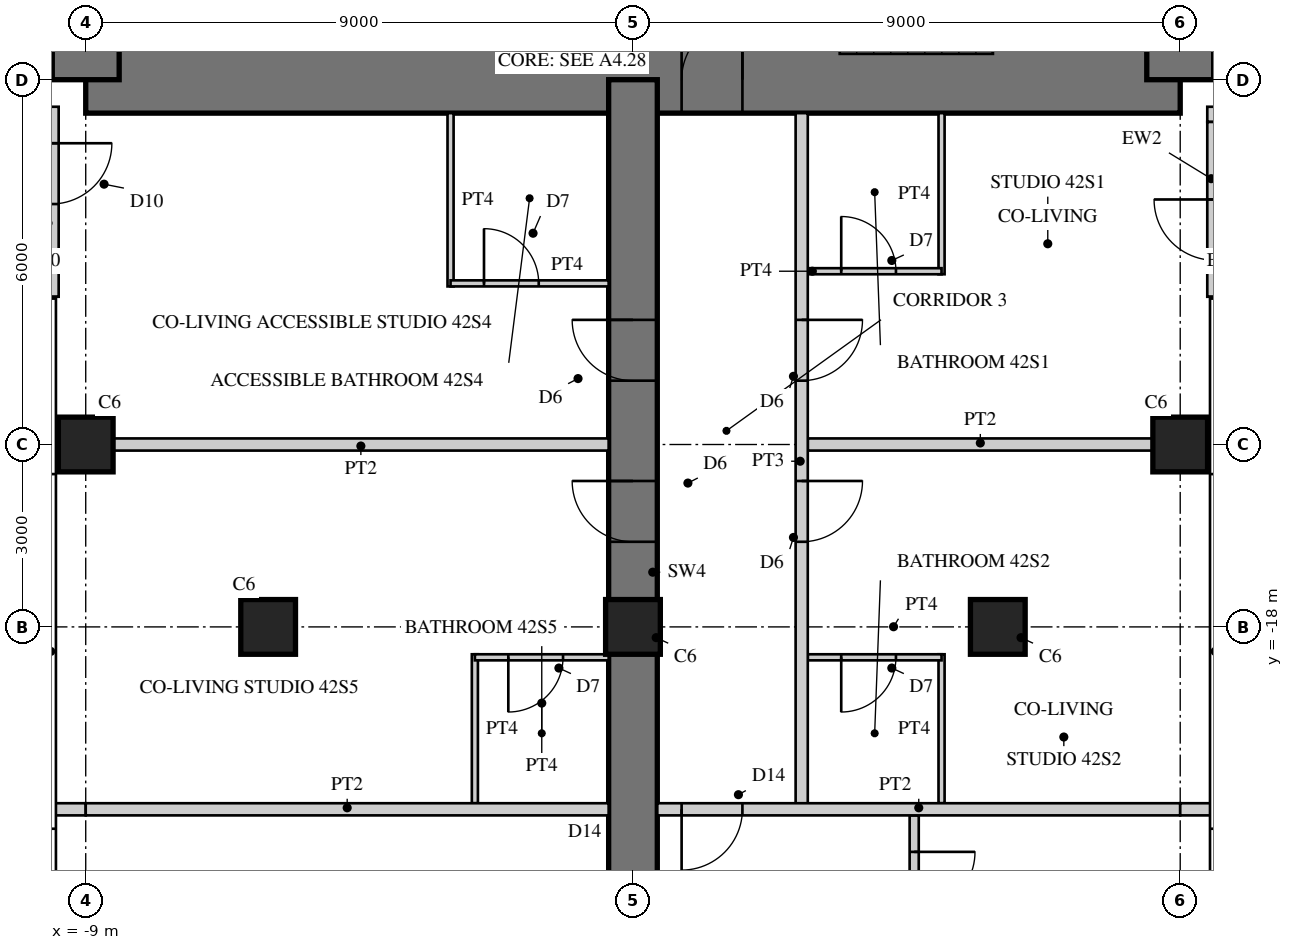
"""IFC4 building model, lengths in metres.
Left out: names, types, materials, properties, quantities, classifications, styles, units other than length and angle.
Written with IfcOpenShell. Run it as: python <this file> out.ifc"""

import sys

from ifc_helpers import new_model, si_unit, direction, frame, frame_2d, origin, origin_2d, place, context, subcontext, project, spatial, rectangle, hollow_rectangle, extrude, element, fill, save


model = new_model("IFC4")
c1 = context("Model", 3, precision=1e-05, world=origin(), true_north=direction((0.0, 1.0)))
c2 = subcontext(c1, "Body", "Model", "MODEL_VIEW")
j1 = project(units=[si_unit("LENGTHUNIT", "METRE"), si_unit("PLANEANGLEUNIT", "RADIAN")], contexts=[c1])
p1 = place(None, origin())
s1 = spatial("IfcSite", under=j1, at=p1, CompositionType="ELEMENT")
p2 = place(p1, origin())
s2 = spatial("IfcBuilding", under=s1, at=p2, CompositionType="ELEMENT")
p3 = place(p2, frame((0.0, 0.0, 172.9)))
s3 = spatial("IfcBuildingStorey", under=s2, at=p3, CompositionType="ELEMENT", Elevation=172.9)
p4 = place(p3, frame((-9.0, -9.0, 0.0), z_axis=(0.0, 0.0, 1.0), x_axis=(1.0, 0.0, 0.0)))
e1 = element("IfcWall", 1, at=p4, inside=s3, PredefinedType="SHEAR", context=c2, shape_type="SweptSolid", body=[
    extrude(rectangle(XDim=18.0, YDim=1.1, at=frame_2d((9.0, 0.0))), origin(), (0.0, 0.0, 1.0), 3.4),
])
p5 = place(p4, frame((9.8, 0.0, 0.0)))
e2 = element("IfcOpeningElement", 2, at=p5, cuts=e1, PredefinedType="OPENING", context=c2, shape_type="SweptSolid", body=[
    extrude(rectangle(XDim=1.0, YDim=2.4, at=frame_2d((0.5, 1.2))), frame((0.0, 0.56, 0.0), z_axis=(0.0, -1.0, 0.0), x_axis=(1.0, 0.0, 0.0)), (0.0, 0.0, 1.0), 1.12),
])
p6 = place(p3, frame((9.0, -9.0, 0.0), z_axis=(0.0, 0.0, 1.0), x_axis=(0.0, 1.0, 0.0)))
e3 = element("IfcWall", 3, at=p6, inside=s3, PredefinedType="SHEAR", context=c2, shape_type="SweptSolid", body=[
    extrude(rectangle(XDim=18.0, YDim=1.1, at=frame_2d((9.0, 0.0))), origin(), (0.0, 0.0, 1.0), 3.4),
])
p7 = place(p6, frame((9.8, 0.0, 0.0)))
e4 = element("IfcOpeningElement", 4, at=p7, cuts=e3, PredefinedType="OPENING", context=c2, shape_type="SweptSolid", body=[
    extrude(rectangle(XDim=1.0, YDim=2.4, at=frame_2d((0.5, 1.2))), frame((0.0, 0.56, 0.0), z_axis=(0.0, -1.0, 0.0), x_axis=(1.0, 0.0, 0.0)), (0.0, 0.0, 1.0), 1.12),
])
p8 = place(p3, frame((-9.0, 9.0, 0.0), z_axis=(0.0, 0.0, 1.0), x_axis=(0.0, -1.0, 0.0)))
e5 = element("IfcWall", 5, at=p8, inside=s3, PredefinedType="SHEAR", context=c2, shape_type="SweptSolid", body=[
    extrude(rectangle(XDim=18.0, YDim=1.1, at=frame_2d((9.0, 0.0))), origin(), (0.0, 0.0, 1.0), 3.4),
])
p9 = place(p8, frame((9.8, 0.0, 0.0)))
e6 = element("IfcOpeningElement", 6, at=p9, cuts=e5, PredefinedType="OPENING", context=c2, shape_type="SweptSolid", body=[
    extrude(rectangle(XDim=1.0, YDim=2.4, at=frame_2d((0.5, 1.2))), frame((0.0, 0.56, 0.0), z_axis=(0.0, -1.0, 0.0), x_axis=(1.0, 0.0, 0.0)), (0.0, 0.0, 1.0), 1.12),
])
p10 = place(p3, frame((0.0, -9.0, 0.0), z_axis=(0.0, 0.0, 1.0), x_axis=(0.0, -1.0, 0.0)))
e7 = element("IfcWall", 7, at=p10, inside=s3, PredefinedType="SHEAR", context=c2, shape_type="SweptSolid", body=[
    extrude(rectangle(XDim=18.0, YDim=0.8, at=frame_2d((9.0, 0.0))), origin(), (0.0, 0.0, 1.0), 3.4),
])
p11 = place(p10, frame((3.95, 0.0, 0.0)))
e8 = element("IfcOpeningElement", 8, at=p11, cuts=e7, PredefinedType="OPENING", context=c2, shape_type="SweptSolid", body=[
    extrude(rectangle(XDim=1.0, YDim=2.15, at=frame_2d((0.5, 1.075))), frame((0.0, 0.41, 0.0), z_axis=(0.0, -1.0, 0.0), x_axis=(1.0, 0.0, 0.0)), (0.0, 0.0, 1.0), 0.82),
])
p12 = place(p10, frame((6.6, 0.0, 0.0)))
e9 = element("IfcOpeningElement", 9, at=p12, cuts=e7, PredefinedType="OPENING", context=c2, shape_type="SweptSolid", body=[
    extrude(rectangle(XDim=1.0, YDim=2.15, at=frame_2d((0.5, 1.075))), frame((0.0, 0.41, 0.0), z_axis=(0.0, -1.0, 0.0), x_axis=(1.0, 0.0, 0.0)), (0.0, 0.0, 1.0), 0.82),
])
p13 = place(p10, frame((13.25, 0.0, 0.0)))
e10 = element("IfcOpeningElement", 10, at=p13, cuts=e7, PredefinedType="OPENING", context=c2, shape_type="SweptSolid", body=[
    extrude(rectangle(XDim=1.0, YDim=2.2, at=frame_2d((0.5, 1.1))), frame((0.0, 0.41, 0.0), z_axis=(0.0, -1.0, 0.0), x_axis=(1.0, 0.0, 0.0)), (0.0, 0.0, 1.0), 0.82),
])
for number, where, z_axis, x_axis in (
    (11, (-9.0, -15.0, 0.0), (0.0, 0.0, 1.0), (1.0, 0.0, 0.0)),
    (12, (9.0, -15.0, 0.0), (0.0, 0.0, 1.0), (1.0, 0.0, 0.0)),
    (13, (-6.0, -18.0, 0.0), (0.0, 0.0, 1.0), (1.0, 0.0, 0.0)),
    (14, (0.0, -18.0, 0.0), (0.0, 0.0, 1.0), (1.0, 0.0, 0.0)),
    (15, (6.0, -18.0, 0.0), (0.0, 0.0, 1.0), (1.0, 0.0, 0.0)),
):
    element("IfcColumn", number, at=place(p3, frame(where, z_axis=z_axis, x_axis=x_axis)), inside=s3, PredefinedType="COLUMN", context=c2, shape_type="SweptSolid", body=[
        extrude(rectangle(XDim=0.9, YDim=0.9, at=origin_2d()), origin(), (0.0, 0.0, 1.0), 3.4),
    ])
p14 = place(p3, frame((9.445, -9.57, 0.0), z_axis=(0.0, 0.0, 1.0), x_axis=(1.0, 0.0, 0.0)))
e16 = element("IfcWall", 16, at=p14, inside=s3, PredefinedType="SOLIDWALL", context=c2, shape_type="SweptSolid", body=[
    extrude(rectangle(XDim=3.125, YDim=0.25, at=frame_2d((1.562, 0.0))), origin(), (0.0, 0.0, 1.0), 3.22),
])
p15 = place(p14, frame((0.6, 0.0, 0.0)))
e17 = element("IfcOpeningElement", 17, at=p15, cuts=e16, PredefinedType="OPENING", context=c2, shape_type="SweptSolid", body=[
    extrude(rectangle(XDim=1.0, YDim=2.2, at=frame_2d((0.5, 1.1))), frame((0.0, 0.135, 0.0), z_axis=(0.0, -1.0, 0.0), x_axis=(1.0, 0.0, 0.0)), (0.0, 0.0, 1.0), 0.27),
])
p16 = place(p3, frame((-9.57, -9.445, 0.0), z_axis=(0.0, 0.0, 1.0), x_axis=(0.0, -1.0, 0.0)))
e18 = element("IfcWall", 18, at=p16, inside=s3, PredefinedType="SOLIDWALL", context=c2, shape_type="SweptSolid", body=[
    extrude(rectangle(XDim=3.125, YDim=0.25, at=frame_2d((1.562, 0.0))), origin(), (0.0, 0.0, 1.0), 3.22),
])
p17 = place(p16, frame((0.6, 0.0, 0.0)))
e19 = element("IfcOpeningElement", 19, at=p17, cuts=e18, PredefinedType="OPENING", context=c2, shape_type="SweptSolid", body=[
    extrude(rectangle(XDim=1.0, YDim=2.2, at=frame_2d((0.5, 1.1))), frame((0.0, 0.135, 0.0), z_axis=(0.0, -1.0, 0.0), x_axis=(1.0, 0.0, 0.0)), (0.0, 0.0, 1.0), 0.27),
])
p18 = place(p3, frame((9.57, -12.57, 0.0), z_axis=(0.0, 0.0, 1.0), x_axis=(0.0, 1.0, 0.0)))
e20 = element("IfcWall", 20, at=p18, inside=s3, PredefinedType="SOLIDWALL", context=c2, shape_type="SweptSolid", body=[
    extrude(rectangle(XDim=2.875, YDim=0.25, at=frame_2d((1.438, 0.0))), origin(), (0.0, 0.0, 1.0), 3.22),
])
p19 = place(p18, frame((0.6, 0.0, 0.0)))
e21 = element("IfcOpeningElement", 21, at=p19, cuts=e20, PredefinedType="OPENING", context=c2, shape_type="SweptSolid", body=[
    extrude(rectangle(XDim=1.0, YDim=2.2, at=frame_2d((0.5, 1.1))), frame((0.0, 0.135, 0.0), z_axis=(0.0, -1.0, 0.0), x_axis=(1.0, 0.0, 0.0)), (0.0, 0.0, 1.0), 0.27),
])
p20 = place(p3, frame((5.075, -9.55, 0.0), z_axis=(0.0, 0.0, 1.0), x_axis=(0.0, -1.0, 0.0)))
e22 = element("IfcWall", 22, at=p20, inside=s3, PredefinedType="PARTITIONING", context=c2, shape_type="SweptSolid", body=[
    extrude(rectangle(XDim=2.65, YDim=0.1, at=frame_2d((1.325, 0.0))), origin(), (0.0, 0.0, 1.0), 3.22),
])
p21 = place(p3, frame((2.875, -12.15, 0.0), z_axis=(0.0, 0.0, 1.0), x_axis=(1.0, 0.0, 0.0)))
e23 = element("IfcWall", 23, at=p21, inside=s3, PredefinedType="PARTITIONING", context=c2, shape_type="SweptSolid", body=[
    extrude(rectangle(XDim=2.2, YDim=0.1, at=frame_2d((1.1, 0.0))), origin(), (0.0, 0.0, 1.0), 3.22),
])
p22 = place(p21, frame((0.55, 0.0, 0.0)))
e24 = element("IfcOpeningElement", 24, at=p22, cuts=e23, PredefinedType="OPENING", context=c2, shape_type="SweptSolid", body=[
    extrude(rectangle(XDim=0.9, YDim=2.1, at=frame_2d((0.45, 1.05))), frame((0.0, 0.06, 0.0), z_axis=(0.0, -1.0, 0.0), x_axis=(1.0, 0.0, 0.0)), (0.0, 0.0, 1.0), 0.12),
])
p23 = place(p3, frame((-3.0, -9.55, 0.0), z_axis=(0.0, 0.0, 1.0), x_axis=(0.0, -1.0, 0.0)))
e25 = element("IfcWall", 25, at=p23, inside=s3, PredefinedType="PARTITIONING", context=c2, shape_type="SweptSolid", body=[
    extrude(rectangle(XDim=2.85, YDim=0.1, at=frame_2d((1.425, 0.0))), origin(), (0.0, 0.0, 1.0), 3.22),
])
p24 = place(p3, frame((-3.0, -12.35, 0.0), z_axis=(0.0, 0.0, 1.0), x_axis=(1.0, 0.0, 0.0)))
e26 = element("IfcWall", 26, at=p24, inside=s3, PredefinedType="PARTITIONING", context=c2, shape_type="SweptSolid", body=[
    extrude(rectangle(XDim=2.6, YDim=0.1, at=frame_2d((1.3, 0.0))), origin(), (0.0, 0.0, 1.0), 3.22),
])
p25 = place(p24, frame((0.55, 0.0, 0.0)))
e27 = element("IfcOpeningElement", 27, at=p25, cuts=e26, PredefinedType="OPENING", context=c2, shape_type="SweptSolid", body=[
    extrude(rectangle(XDim=0.9, YDim=2.1, at=frame_2d((0.45, 1.05))), frame((0.0, 0.06, 0.0), z_axis=(0.0, -1.0, 0.0), x_axis=(1.0, 0.0, 0.0)), (0.0, 0.0, 1.0), 0.12),
])
p26 = place(p3, frame((2.875, -15.0, 0.0), z_axis=(0.0, 0.0, 1.0), x_axis=(1.0, 0.0, 0.0)))
e28 = element("IfcWall", 28, at=p26, inside=s3, PredefinedType="SOLIDWALL", context=c2, shape_type="SweptSolid", body=[
    extrude(rectangle(XDim=5.675, YDim=0.2, at=frame_2d((2.837, 0.0))), origin(), (0.0, 0.0, 1.0), 2.47),
])
p27 = place(p3, frame((-8.55, -15.0, 0.0), z_axis=(0.0, 0.0, 1.0), x_axis=(1.0, 0.0, 0.0)))
e29 = element("IfcWall", 29, at=p27, inside=s3, PredefinedType="SOLIDWALL", context=c2, shape_type="SweptSolid", body=[
    extrude(rectangle(XDim=8.15, YDim=0.2, at=frame_2d((4.075, 0.0))), origin(), (0.0, 0.0, 1.0), 2.47),
])
p28 = place(p3, frame((5.075, -18.45, 0.0), z_axis=(0.0, 0.0, 1.0), x_axis=(0.0, -1.0, 0.0)))
e30 = element("IfcWall", 30, at=p28, inside=s3, PredefinedType="PARTITIONING", context=c2, shape_type="SweptSolid", body=[
    extrude(rectangle(XDim=2.45, YDim=0.1, at=frame_2d((1.225, 0.0))), origin(), (0.0, 0.0, 1.0), 3.22),
])
p29 = place(p3, frame((2.875, -18.5, 0.0), z_axis=(0.0, 0.0, 1.0), x_axis=(1.0, 0.0, 0.0)))
e31 = element("IfcWall", 31, at=p29, inside=s3, PredefinedType="PARTITIONING", context=c2, shape_type="SweptSolid", body=[
    extrude(rectangle(XDim=2.2, YDim=0.1, at=frame_2d((1.1, 0.0))), origin(), (0.0, 0.0, 1.0), 3.22),
])
p30 = place(p29, frame((0.55, 0.0, 0.0)))
e32 = element("IfcOpeningElement", 32, at=p30, cuts=e31, PredefinedType="OPENING", context=c2, shape_type="SweptSolid", body=[
    extrude(rectangle(XDim=0.9, YDim=2.1, at=frame_2d((0.45, 1.05))), frame((0.0, 0.06, 0.0), z_axis=(0.0, -1.0, 0.0), x_axis=(1.0, 0.0, 0.0)), (0.0, 0.0, 1.0), 0.12),
])
p31 = place(p3, frame((-2.6, -18.45, 0.0), z_axis=(0.0, 0.0, 1.0), x_axis=(0.0, -1.0, 0.0)))
e33 = element("IfcWall", 33, at=p31, inside=s3, PredefinedType="PARTITIONING", context=c2, shape_type="SweptSolid", body=[
    extrude(rectangle(XDim=2.45, YDim=0.1, at=frame_2d((1.225, 0.0))), origin(), (0.0, 0.0, 1.0), 3.22),
])
p32 = place(p3, frame((-2.6, -18.5, 0.0), z_axis=(0.0, 0.0, 1.0), x_axis=(1.0, 0.0, 0.0)))
e34 = element("IfcWall", 34, at=p32, inside=s3, PredefinedType="PARTITIONING", context=c2, shape_type="SweptSolid", body=[
    extrude(rectangle(XDim=2.2, YDim=0.1, at=frame_2d((1.1, 0.0))), origin(), (0.0, 0.0, 1.0), 3.22),
])
p33 = place(p32, frame((0.55, 0.0, 0.0)))
e35 = element("IfcOpeningElement", 35, at=p33, cuts=e34, PredefinedType="OPENING", context=c2, shape_type="SweptSolid", body=[
    extrude(rectangle(XDim=0.9, YDim=2.1, at=frame_2d((0.45, 1.05))), frame((0.0, 0.06, 0.0), z_axis=(0.0, -1.0, 0.0), x_axis=(1.0, 0.0, 0.0)), (0.0, 0.0, 1.0), 0.12),
])
p34 = place(p3, frame((2.775, -9.55, 0.0), z_axis=(0.0, 0.0, 1.0), x_axis=(0.0, -1.0, 0.0)))
e36 = element("IfcWall", 36, at=p34, inside=s3, PredefinedType="SOLIDWALL", context=c2, shape_type="SweptSolid", body=[
    extrude(rectangle(XDim=11.45, YDim=0.2, at=frame_2d((5.725, 0.0))), origin(), (0.0, 0.0, 1.0), 3.22),
])
p35 = place(p34, frame((3.4, 0.0, 0.0)))
e37 = element("IfcOpeningElement", 37, at=p35, cuts=e36, PredefinedType="OPENING", context=c2, shape_type="SweptSolid", body=[
    extrude(rectangle(XDim=1.0, YDim=2.15, at=frame_2d((0.5, 1.075))), frame((0.0, 0.11, 0.0), z_axis=(0.0, -1.0, 0.0), x_axis=(1.0, 0.0, 0.0)), (0.0, 0.0, 1.0), 0.22),
])
p36 = place(p34, frame((6.05, 0.0, 0.0)))
e38 = element("IfcOpeningElement", 38, at=p36, cuts=e36, PredefinedType="OPENING", context=c2, shape_type="SweptSolid", body=[
    extrude(rectangle(XDim=1.0, YDim=2.15, at=frame_2d((0.5, 1.075))), frame((0.0, 0.11, 0.0), z_axis=(0.0, -1.0, 0.0), x_axis=(1.0, 0.0, 0.0)), (0.0, 0.0, 1.0), 0.22),
])
p37 = place(p3, frame((4.625, -21.1, 0.0), z_axis=(0.0, 0.0, 1.0), x_axis=(0.0, -1.0, 0.0)))
e39 = element("IfcWall", 39, at=p37, inside=s3, PredefinedType="PARTITIONING", context=c2, shape_type="SweptSolid", body=[
    extrude(rectangle(XDim=5.5, YDim=0.15, at=frame_2d((2.75, 0.0))), origin(), (0.0, 0.0, 1.0), 3.22),
])
p38 = place(p37, frame((0.6, 0.0, 0.0)))
e40 = element("IfcOpeningElement", 40, at=p38, cuts=e39, PredefinedType="OPENING", context=c2, shape_type="SweptSolid", body=[
    extrude(rectangle(XDim=1.0, YDim=2.1, at=frame_2d((0.5, 1.05))), frame((0.0, 0.085, 0.0), z_axis=(0.0, -1.0, 0.0), x_axis=(1.0, 0.0, 0.0)), (0.0, 0.0, 1.0), 0.17),
])
p39 = place(p3, frame((-9.53, -21.0, 0.0), z_axis=(0.0, 0.0, 1.0), x_axis=(1.0, 0.0, 0.0)))
e41 = element("IfcWall", 41, at=p39, inside=s3, PredefinedType="SOLIDWALL", context=c2, shape_type="SweptSolid", body=[
    extrude(rectangle(XDim=0.53, YDim=0.2, at=frame_2d((0.265, 0.0))), origin(), (0.0, 0.0, 1.0), 3.22),
])
p40 = place(p3, frame((-9.0, -21.0, 0.0), z_axis=(0.0, 0.0, 1.0), x_axis=(1.0, 0.0, 0.0)))
e42 = element("IfcWall", 42, at=p40, inside=s3, PredefinedType="SOLIDWALL", context=c2, shape_type="SweptSolid", body=[
    extrude(rectangle(XDim=8.6, YDim=0.2, at=frame_2d((4.3, 0.0))), origin(), (0.0, 0.0, 1.0), 2.62),
])
p41 = place(p3, frame((0.4, -21.0, 0.0), z_axis=(0.0, 0.0, 1.0), x_axis=(1.0, 0.0, 0.0)))
e43 = element("IfcWall", 43, at=p41, inside=s3, PredefinedType="SOLIDWALL", context=c2, shape_type="SweptSolid", body=[
    extrude(rectangle(XDim=8.6, YDim=0.2, at=frame_2d((4.3, 0.0))), origin(), (0.0, 0.0, 1.0), 2.62),
])
p42 = place(p41, frame((0.4, 0.0, 0.0)))
e44 = element("IfcOpeningElement", 44, at=p42, cuts=e43, PredefinedType="OPENING", context=c2, shape_type="SweptSolid", body=[
    extrude(rectangle(XDim=1.0, YDim=2.2, at=frame_2d((0.5, 1.1))), frame((0.0, 0.11, 0.0), z_axis=(0.0, -1.0, 0.0), x_axis=(1.0, 0.0, 0.0)), (0.0, 0.0, 1.0), 0.22),
])
p43 = place(p3, frame((9.0, -21.0, 0.0), z_axis=(0.0, 0.0, 1.0), x_axis=(1.0, 0.0, 0.0)))
e45 = element("IfcWall", 45, at=p43, inside=s3, PredefinedType="SOLIDWALL", context=c2, shape_type="SweptSolid", body=[
    extrude(rectangle(XDim=0.53, YDim=0.2, at=frame_2d((0.265, 0.0))), origin(), (0.0, 0.0, 1.0), 3.22),
])
p44 = place(p17, origin())
e46 = element("IfcDoor", 46, at=p44, inside=s3, OperationType="SINGLE_SWING_LEFT", PredefinedType="DOOR", context=c2, shape_type="SweptSolid", body=[
    extrude(hollow_rectangle(XDim=1.0, YDim=2.2, WallThickness=0.06, at=frame_2d((0.5, 1.1))), frame((0.0, 0.025, 0.0), z_axis=(0.0, -1.0, 0.0), x_axis=(1.0, 0.0, 0.0)), (0.0, 0.0, 1.0), 0.05),
    extrude(rectangle(XDim=0.879, YDim=2.079, at=frame_2d((0.5, 1.1))), frame((0.0, 0.025, 0.0), z_axis=(0.0, -1.0, 0.0), x_axis=(1.0, 0.0, 0.0)), (0.0, 0.0, 1.0), 0.05),
])
fill(e19, e46)
p45 = place(p19, origin())
e47 = element("IfcDoor", 47, at=p45, inside=s3, OperationType="SINGLE_SWING_RIGHT", PredefinedType="DOOR", context=c2, shape_type="SweptSolid", body=[
    extrude(hollow_rectangle(XDim=1.0, YDim=2.2, WallThickness=0.06, at=frame_2d((0.5, 1.1))), frame((0.0, 0.025, 0.0), z_axis=(0.0, -1.0, 0.0), x_axis=(1.0, 0.0, 0.0)), (0.0, 0.0, 1.0), 0.05),
    extrude(rectangle(XDim=0.879, YDim=2.079, at=frame_2d((0.5, 1.1))), frame((0.0, 0.025, 0.0), z_axis=(0.0, -1.0, 0.0), x_axis=(1.0, 0.0, 0.0)), (0.0, 0.0, 1.0), 0.05),
])
fill(e21, e47)
p46 = place(p22, origin())
e48 = element("IfcDoor", 48, at=p46, inside=s3, OperationType="SINGLE_SWING_LEFT", PredefinedType="DOOR", context=c2, shape_type="SweptSolid", body=[
    extrude(rectangle(XDim=0.9, YDim=2.1, at=frame_2d((0.45, 1.05))), frame((0.0, 0.025, 0.0), z_axis=(0.0, -1.0, 0.0), x_axis=(1.0, 0.0, 0.0)), (0.0, 0.0, 1.0), 0.05),
])
fill(e24, e48)
p47 = place(p25, origin())
e49 = element("IfcDoor", 49, at=p47, inside=s3, OperationType="SINGLE_SWING_LEFT", PredefinedType="DOOR", context=c2, shape_type="SweptSolid", body=[
    extrude(rectangle(XDim=0.9, YDim=2.1, at=frame_2d((0.45, 1.05))), frame((0.0, 0.025, 0.0), z_axis=(0.0, -1.0, 0.0), x_axis=(1.0, 0.0, 0.0)), (0.0, 0.0, 1.0), 0.05),
])
fill(e27, e49)
p48 = place(p30, frame((0.9, 0.0, 0.0), z_axis=(0.0, 0.0, 1.0), x_axis=(-1.0, 0.0, 0.0)))
e50 = element("IfcDoor", 50, at=p48, inside=s3, OperationType="SINGLE_SWING_RIGHT", PredefinedType="DOOR", context=c2, shape_type="SweptSolid", body=[
    extrude(rectangle(XDim=0.9, YDim=2.1, at=frame_2d((0.45, 1.05))), frame((0.0, 0.025, 0.0), z_axis=(0.0, -1.0, 0.0), x_axis=(1.0, 0.0, 0.0)), (0.0, 0.0, 1.0), 0.05),
])
fill(e32, e50)
p49 = place(p33, frame((0.9, 0.0, 0.0), z_axis=(0.0, 0.0, 1.0), x_axis=(-1.0, 0.0, 0.0)))
e51 = element("IfcDoor", 51, at=p49, inside=s3, OperationType="SINGLE_SWING_RIGHT", PredefinedType="DOOR", context=c2, shape_type="SweptSolid", body=[
    extrude(rectangle(XDim=0.9, YDim=2.1, at=frame_2d((0.45, 1.05))), frame((0.0, 0.025, 0.0), z_axis=(0.0, -1.0, 0.0), x_axis=(1.0, 0.0, 0.0)), (0.0, 0.0, 1.0), 0.05),
])
fill(e35, e51)
p50 = place(p35, origin())
e52 = element("IfcDoor", 52, at=p50, inside=s3, OperationType="SINGLE_SWING_LEFT", PredefinedType="DOOR", context=c2, shape_type="SweptSolid", body=[
    extrude(rectangle(XDim=1.0, YDim=2.15, at=frame_2d((0.5, 1.075))), frame((0.0, 0.025, 0.0), z_axis=(0.0, -1.0, 0.0), x_axis=(1.0, 0.0, 0.0)), (0.0, 0.0, 1.0), 0.05),
])
fill(e37, e52)
p51 = place(p36, origin())
e53 = element("IfcDoor", 53, at=p51, inside=s3, OperationType="SINGLE_SWING_LEFT", PredefinedType="DOOR", context=c2, shape_type="SweptSolid", body=[
    extrude(rectangle(XDim=1.0, YDim=2.15, at=frame_2d((0.5, 1.075))), frame((0.0, 0.025, 0.0), z_axis=(0.0, -1.0, 0.0), x_axis=(1.0, 0.0, 0.0)), (0.0, 0.0, 1.0), 0.05),
])
fill(e38, e53)
p52 = place(p38, origin())
e54 = element("IfcDoor", 54, at=p52, inside=s3, OperationType="SINGLE_SWING_LEFT", PredefinedType="DOOR", context=c2, shape_type="SweptSolid", body=[
    extrude(rectangle(XDim=1.0, YDim=2.1, at=frame_2d((0.5, 1.05))), frame((0.0, 0.025, 0.0), z_axis=(0.0, -1.0, 0.0), x_axis=(1.0, 0.0, 0.0)), (0.0, 0.0, 1.0), 0.05),
])
fill(e40, e54)
p53 = place(p42, frame((1.0, 0.0, 0.0), z_axis=(0.0, 0.0, 1.0), x_axis=(-1.0, 0.0, 0.0)))
e55 = element("IfcDoor", 55, at=p53, inside=s3, OperationType="SINGLE_SWING_RIGHT", PredefinedType="DOOR", context=c2, shape_type="SweptSolid", body=[
    extrude(rectangle(XDim=1.0, YDim=2.2, at=frame_2d((0.5, 1.1))), frame((0.0, 0.025, 0.0), z_axis=(0.0, -1.0, 0.0), x_axis=(1.0, 0.0, 0.0)), (0.0, 0.0, 1.0), 0.05),
])
fill(e44, e55)
p54 = place(p11, frame((1.0, 0.0, 0.0), z_axis=(0.0, 0.0, 1.0), x_axis=(-1.0, 0.0, 0.0)))
e56 = element("IfcDoor", 56, at=p54, inside=s3, OperationType="SINGLE_SWING_RIGHT", PredefinedType="DOOR", context=c2, shape_type="SweptSolid", body=[
    extrude(rectangle(XDim=1.0, YDim=2.15, at=frame_2d((0.5, 1.075))), frame((0.0, 0.025, 0.0), z_axis=(0.0, -1.0, 0.0), x_axis=(1.0, 0.0, 0.0)), (0.0, 0.0, 1.0), 0.05),
])
fill(e8, e56)
p55 = place(p12, frame((1.0, 0.0, 0.0), z_axis=(0.0, 0.0, 1.0), x_axis=(-1.0, 0.0, 0.0)))
e57 = element("IfcDoor", 57, at=p55, inside=s3, OperationType="SINGLE_SWING_RIGHT", PredefinedType="DOOR", context=c2, shape_type="SweptSolid", body=[
    extrude(rectangle(XDim=1.0, YDim=2.15, at=frame_2d((0.5, 1.075))), frame((0.0, 0.025, 0.0), z_axis=(0.0, -1.0, 0.0), x_axis=(1.0, 0.0, 0.0)), (0.0, 0.0, 1.0), 0.05),
])
fill(e9, e57)
p56 = place(p5, origin())
e58 = element("IfcDoor", 58, at=p56, inside=s3, OperationType="SINGLE_SWING_RIGHT", PredefinedType="DOOR", context=c2, shape_type="SweptSolid", body=[
    extrude(rectangle(XDim=1.0, YDim=2.4, at=frame_2d((0.5, 1.2))), frame((0.0, 0.055, 0.0), z_axis=(0.0, -1.0, 0.0), x_axis=(1.0, 0.0, 0.0)), (0.0, 0.0, 1.0), 0.05),
])
fill(e2, e58)
save(model, sys.argv[1])
